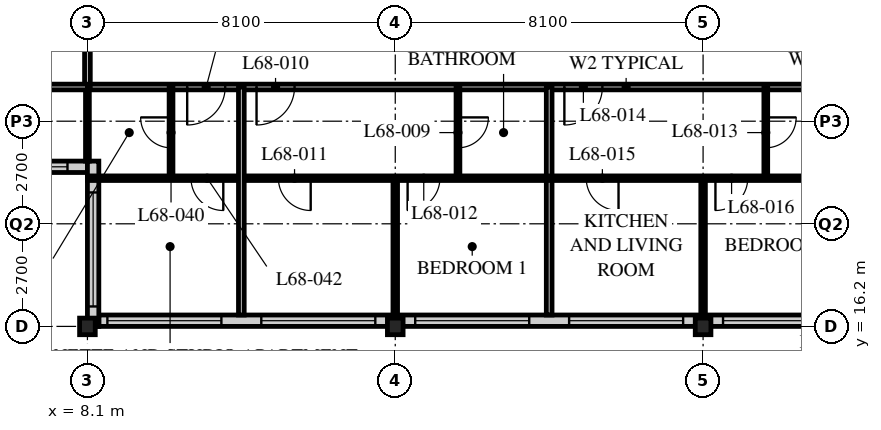
"""IFC4 building model, lengths in metres.
Left out: names, types, materials, properties, quantities, classifications, styles, units other than length and angle.
Written with IfcOpenShell. Run it as: python <this file> out.ifc"""

import sys

from ifc_helpers import new_model, si_unit, direction, frame, frame_2d, origin, origin_2d, place, context, subcontext, project, spatial, rectangle, i_section, extrude, element, fill, save


model = new_model("IFC4")
c1 = context("Model", 3, precision=1e-05, world=origin(), true_north=direction((0.0, 1.0)))
c2 = subcontext(c1, "Body", "Model", "MODEL_VIEW")
j1 = project(units=[si_unit("LENGTHUNIT", "METRE"), si_unit("PLANEANGLEUNIT", "RADIAN")], contexts=[c1])
p1 = place(None, origin())
s1 = spatial("IfcSite", under=j1, at=p1, CompositionType="ELEMENT")
p2 = place(p1, origin())
s2 = spatial("IfcBuilding", under=s1, at=p2, CompositionType="ELEMENT")
p3 = place(p2, frame((0.0, 0.0, 265.8)))
s3 = spatial("IfcBuildingStorey", under=s2, at=p3, CompositionType="ELEMENT", Elevation=265.8)
for number, where, z_axis, x_axis in (
    (1, (8.1, 16.2, 0.0), (0.0, 0.0, 1.0), (1.0, 0.0, 0.0)),
    (2, (16.2, 16.2, 0.0), (0.0, 0.0, 1.0), (1.0, 0.0, 0.0)),
    (3, (24.3, 16.2, 0.0), (0.0, 0.0, 1.0), (1.0, 0.0, 0.0)),
):
    element("IfcColumn", number, at=place(p3, frame(where, z_axis=z_axis, x_axis=x_axis)), inside=s3, PredefinedType="COLUMN", context=c2, shape_type="SweptSolid", body=[
        extrude(i_section(OverallWidth=0.412, OverallDepth=0.437, WebThickness=0.036, FlangeThickness=0.058, FilletRadius=0.015, at=origin_2d()), origin(), (0.0, 0.0, 1.0), 3.9),
    ])
p4 = place(p3, frame((8.4, 16.35, 0.0), z_axis=(0.0, 0.0, 1.0), x_axis=(1.0, 0.0, 0.0)))
e4 = element("IfcWall", 4, at=p4, inside=s3, PredefinedType="SOLIDWALL", context=c2, shape_type="SweptSolid", body=[
    extrude(rectangle(XDim=40.2, YDim=0.3, at=frame_2d((20.1, 0.0))), origin(), (0.0, 0.0, 1.0), 3.69),
])
p5 = place(p4, frame((0.225, 0.0, 0.6)))
e5 = element("IfcOpeningElement", 5, at=p5, cuts=e4, PredefinedType="OPENING", context=c2, shape_type="SweptSolid", body=[
    extrude(rectangle(XDim=3.0, YDim=2.4, at=frame_2d((1.5, 1.2))), frame((0.0, 0.16, 0.0), z_axis=(0.0, -1.0, 0.0), x_axis=(1.0, 0.0, 0.0)), (0.0, 0.0, 1.0), 0.32),
])
p6 = place(p4, frame((4.275, 0.0, 0.6)))
e6 = element("IfcOpeningElement", 6, at=p6, cuts=e4, PredefinedType="OPENING", context=c2, shape_type="SweptSolid", body=[
    extrude(rectangle(XDim=3.0, YDim=2.4, at=frame_2d((1.5, 1.2))), frame((0.0, 0.16, 0.0), z_axis=(0.0, -1.0, 0.0), x_axis=(1.0, 0.0, 0.0)), (0.0, 0.0, 1.0), 0.32),
])
p7 = place(p4, frame((8.325, 0.0, 0.6)))
e7 = element("IfcOpeningElement", 7, at=p7, cuts=e4, PredefinedType="OPENING", context=c2, shape_type="SweptSolid", body=[
    extrude(rectangle(XDim=3.0, YDim=2.4, at=frame_2d((1.5, 1.2))), frame((0.0, 0.16, 0.0), z_axis=(0.0, -1.0, 0.0), x_axis=(1.0, 0.0, 0.0)), (0.0, 0.0, 1.0), 0.32),
])
p8 = place(p4, frame((12.375, 0.0, 0.6)))
e8 = element("IfcOpeningElement", 8, at=p8, cuts=e4, PredefinedType="OPENING", context=c2, shape_type="SweptSolid", body=[
    extrude(rectangle(XDim=3.0, YDim=2.4, at=frame_2d((1.5, 1.2))), frame((0.0, 0.16, 0.0), z_axis=(0.0, -1.0, 0.0), x_axis=(1.0, 0.0, 0.0)), (0.0, 0.0, 1.0), 0.32),
])
p9 = place(p4, frame((16.425, 0.0, 0.6)))
e9 = element("IfcOpeningElement", 9, at=p9, cuts=e4, PredefinedType="OPENING", context=c2, shape_type="SweptSolid", body=[
    extrude(rectangle(XDim=3.0, YDim=2.4, at=frame_2d((1.5, 1.2))), frame((0.0, 0.16, 0.0), z_axis=(0.0, -1.0, 0.0), x_axis=(1.0, 0.0, 0.0)), (0.0, 0.0, 1.0), 0.32),
])
p10 = place(p4, frame((20.475, 0.0, 0.6)))
e10 = element("IfcOpeningElement", 10, at=p10, cuts=e4, PredefinedType="OPENING", context=c2, shape_type="SweptSolid", body=[
    extrude(rectangle(XDim=3.0, YDim=2.4, at=frame_2d((1.5, 1.2))), frame((0.0, 0.16, 0.0), z_axis=(0.0, -1.0, 0.0), x_axis=(1.0, 0.0, 0.0)), (0.0, 0.0, 1.0), 0.32),
])
p11 = place(p4, frame((24.525, 0.0, 0.6)))
e11 = element("IfcOpeningElement", 11, at=p11, cuts=e4, PredefinedType="OPENING", context=c2, shape_type="SweptSolid", body=[
    extrude(rectangle(XDim=3.0, YDim=2.4, at=frame_2d((1.5, 1.2))), frame((0.0, 0.16, 0.0), z_axis=(0.0, -1.0, 0.0), x_axis=(1.0, 0.0, 0.0)), (0.0, 0.0, 1.0), 0.32),
])
p12 = place(p4, frame((28.575, 0.0, 0.6)))
e12 = element("IfcOpeningElement", 12, at=p12, cuts=e4, PredefinedType="OPENING", context=c2, shape_type="SweptSolid", body=[
    extrude(rectangle(XDim=3.0, YDim=2.4, at=frame_2d((1.5, 1.2))), frame((0.0, 0.16, 0.0), z_axis=(0.0, -1.0, 0.0), x_axis=(1.0, 0.0, 0.0)), (0.0, 0.0, 1.0), 0.32),
])
p13 = place(p4, frame((32.625, 0.0, 0.6)))
e13 = element("IfcOpeningElement", 13, at=p13, cuts=e4, PredefinedType="OPENING", context=c2, shape_type="SweptSolid", body=[
    extrude(rectangle(XDim=3.0, YDim=2.4, at=frame_2d((1.5, 1.2))), frame((0.0, 0.16, 0.0), z_axis=(0.0, -1.0, 0.0), x_axis=(1.0, 0.0, 0.0)), (0.0, 0.0, 1.0), 0.32),
])
p14 = place(p4, frame((36.675, 0.0, 0.6)))
e14 = element("IfcOpeningElement", 14, at=p14, cuts=e4, PredefinedType="OPENING", context=c2, shape_type="SweptSolid", body=[
    extrude(rectangle(XDim=3.0, YDim=2.4, at=frame_2d((1.5, 1.2))), frame((0.0, 0.16, 0.0), z_axis=(0.0, -1.0, 0.0), x_axis=(1.0, 0.0, 0.0)), (0.0, 0.0, 1.0), 0.32),
])
p15 = place(p3, frame((4.35, 20.4, 0.0), z_axis=(0.0, 0.0, 1.0), x_axis=(1.0, 0.0, 0.0)))
e15 = element("IfcWall", 15, at=p15, inside=s3, PredefinedType="SOLIDWALL", context=c2, shape_type="SweptSolid", body=[
    extrude(rectangle(XDim=3.75, YDim=0.3, at=frame_2d((1.875, 0.0))), origin(), (0.0, 0.0, 1.0), 3.69),
])
p16 = place(p15, frame((0.225, 0.0, 0.6)))
e16 = element("IfcOpeningElement", 16, at=p16, cuts=e15, PredefinedType="OPENING", context=c2, shape_type="SweptSolid", body=[
    extrude(rectangle(XDim=3.0, YDim=2.3, at=frame_2d((1.5, 1.15))), frame((0.0, 0.16, 0.0), z_axis=(0.0, -1.0, 0.0), x_axis=(1.0, 0.0, 0.0)), (0.0, 0.0, 1.0), 0.32),
])
p17 = place(p3, frame((8.25, 20.55, 0.0), z_axis=(0.0, 0.0, 1.0), x_axis=(0.0, -1.0, 0.0)))
e17 = element("IfcWall", 17, at=p17, inside=s3, PredefinedType="SOLIDWALL", context=c2, shape_type="SweptSolid", body=[
    extrude(rectangle(XDim=4.35, YDim=0.3, at=frame_2d((2.175, 0.0))), origin(), (0.0, 0.0, 1.0), 3.69),
])
p18 = place(p17, frame((0.825, 0.0, 0.6)))
e18 = element("IfcOpeningElement", 18, at=p18, cuts=e17, PredefinedType="OPENING", context=c2, shape_type="SweptSolid", body=[
    extrude(rectangle(XDim=3.0, YDim=2.3, at=frame_2d((1.5, 1.15))), frame((0.0, 0.16, 0.0), z_axis=(0.0, -1.0, 0.0), x_axis=(1.0, 0.0, 0.0)), (0.0, 0.0, 1.0), 0.32),
])
p19 = place(p3, frame((8.1, 22.5, 0.0), z_axis=(0.0, 0.0, 1.0), x_axis=(1.0, 0.0, 0.0)))
e19 = element("IfcWall", 19, at=p19, inside=s3, PredefinedType="PARTITIONING", context=c2, shape_type="SweptSolid", body=[
    extrude(rectangle(XDim=28.35, YDim=0.15, at=frame_2d((14.175, 0.0))), origin(), (0.0, 0.0, 1.0), 3.69),
])
p20 = place(p19, frame((4.45, 0.0, 0.0)))
e20 = element("IfcOpeningElement", 20, at=p20, cuts=e19, PredefinedType="OPENING", context=c2, shape_type="SweptSolid", body=[
    extrude(rectangle(XDim=1.0, YDim=2.1, at=frame_2d((0.5, 1.05))), frame((0.0, 0.085, 0.0), z_axis=(0.0, -1.0, 0.0), x_axis=(1.0, 0.0, 0.0)), (0.0, 0.0, 1.0), 0.17),
])
p21 = place(p19, frame((12.55, 0.0, 0.0)))
e21 = element("IfcOpeningElement", 21, at=p21, cuts=e19, PredefinedType="OPENING", context=c2, shape_type="SweptSolid", body=[
    extrude(rectangle(XDim=1.0, YDim=2.1, at=frame_2d((0.5, 1.05))), frame((0.0, 0.085, 0.0), z_axis=(0.0, -1.0, 0.0), x_axis=(1.0, 0.0, 0.0)), (0.0, 0.0, 1.0), 0.17),
])
p22 = place(p19, frame((20.65, 0.0, 0.0)))
e22 = element("IfcOpeningElement", 22, at=p22, cuts=e19, PredefinedType="OPENING", context=c2, shape_type="SweptSolid", body=[
    extrude(rectangle(XDim=1.0, YDim=2.1, at=frame_2d((0.5, 1.05))), frame((0.0, 0.085, 0.0), z_axis=(0.0, -1.0, 0.0), x_axis=(1.0, 0.0, 0.0)), (0.0, 0.0, 1.0), 0.17),
])
p23 = place(p19, frame((2.625, 0.0, 0.0)))
e23 = element("IfcOpeningElement", 23, at=p23, cuts=e19, PredefinedType="OPENING", context=c2, shape_type="SweptSolid", body=[
    extrude(rectangle(XDim=1.0, YDim=2.1, at=frame_2d((0.5, 1.05))), frame((0.0, 0.085, 0.0), z_axis=(0.0, -1.0, 0.0), x_axis=(1.0, 0.0, 0.0)), (0.0, 0.0, 1.0), 0.17),
])
p24 = place(p3, frame((8.1, 22.5, 0.0), z_axis=(0.0, 0.0, 1.0), x_axis=(0.0, 1.0, 0.0)))
e24 = element("IfcWall", 24, at=p24, inside=s3, PredefinedType="PARTITIONING", context=c2, shape_type="SweptSolid", body=[
    extrude(rectangle(XDim=26.1, YDim=0.15, at=frame_2d((13.05, 0.0))), origin(), (0.0, 0.0, 1.0), 3.078),
])
p25 = place(p24, frame((2.65, 0.0, 0.0)))
e25 = element("IfcOpeningElement", 25, at=p25, cuts=e24, PredefinedType="OPENING", context=c2, shape_type="SweptSolid", body=[
    extrude(rectangle(XDim=1.0, YDim=2.1, at=frame_2d((0.5, 1.05))), frame((0.0, 0.085, 0.0), z_axis=(0.0, -1.0, 0.0), x_axis=(1.0, 0.0, 0.0)), (0.0, 0.0, 1.0), 0.17),
])
p26 = place(p24, frame((22.75, 0.0, 0.0)))
e26 = element("IfcOpeningElement", 26, at=p26, cuts=e24, PredefinedType="OPENING", context=c2, shape_type="SweptSolid", body=[
    extrude(rectangle(XDim=1.0, YDim=2.1, at=frame_2d((0.5, 1.05))), frame((0.0, 0.085, 0.0), z_axis=(0.0, -1.0, 0.0), x_axis=(1.0, 0.0, 0.0)), (0.0, 0.0, 1.0), 0.17),
])
p27 = place(p3, frame((17.85, 22.5, 0.0), z_axis=(0.0, 0.0, 1.0), x_axis=(0.0, -1.0, 0.0)))
e27 = element("IfcWall", 27, at=p27, inside=s3, PredefinedType="PARTITIONING", context=c2, shape_type="SweptSolid", body=[
    extrude(rectangle(XDim=2.4, YDim=0.1, at=frame_2d((1.2, 0.0))), origin(), (0.0, 0.0, 1.0), 3.69),
])
p28 = place(p27, frame((0.8, 0.0, 0.0)))
e28 = element("IfcOpeningElement", 28, at=p28, cuts=e27, PredefinedType="OPENING", context=c2, shape_type="SweptSolid", body=[
    extrude(rectangle(XDim=0.8, YDim=2.1, at=frame_2d((0.4, 1.05))), frame((0.0, 0.06, 0.0), z_axis=(0.0, -1.0, 0.0), x_axis=(1.0, 0.0, 0.0)), (0.0, 0.0, 1.0), 0.12),
])
p29 = place(p3, frame((16.2, 20.1, 0.0), z_axis=(0.0, 0.0, 1.0), x_axis=(0.0, -1.0, 0.0)))
e29 = element("IfcWall", 29, at=p29, inside=s3, PredefinedType="PARTITIONING", context=c2, shape_type="SweptSolid", body=[
    extrude(rectangle(XDim=3.6, YDim=0.12, at=frame_2d((1.8, 0.0))), origin(), (0.0, 0.0, 1.0), 3.078),
])
p30 = place(p3, frame((20.25, 22.5, 0.0), z_axis=(0.0, 0.0, 1.0), x_axis=(0.0, -1.0, 0.0)))
e30 = element("IfcWall", 30, at=p30, inside=s3, PredefinedType="PARTITIONING", context=c2, shape_type="SweptSolid", body=[
    extrude(rectangle(XDim=6.0, YDim=0.15, at=frame_2d((3.0, 0.0))), origin(), (0.0, 0.0, 1.0), 3.69),
])
p31 = place(p3, frame((25.95, 22.5, 0.0), z_axis=(0.0, 0.0, 1.0), x_axis=(0.0, -1.0, 0.0)))
e31 = element("IfcWall", 31, at=p31, inside=s3, PredefinedType="PARTITIONING", context=c2, shape_type="SweptSolid", body=[
    extrude(rectangle(XDim=2.4, YDim=0.1, at=frame_2d((1.2, 0.0))), origin(), (0.0, 0.0, 1.0), 3.69),
])
p32 = place(p31, frame((0.8, 0.0, 0.0)))
e32 = element("IfcOpeningElement", 32, at=p32, cuts=e31, PredefinedType="OPENING", context=c2, shape_type="SweptSolid", body=[
    extrude(rectangle(XDim=0.8, YDim=2.1, at=frame_2d((0.4, 1.05))), frame((0.0, 0.06, 0.0), z_axis=(0.0, -1.0, 0.0), x_axis=(1.0, 0.0, 0.0)), (0.0, 0.0, 1.0), 0.12),
])
p33 = place(p3, frame((24.3, 20.1, 0.0), z_axis=(0.0, 0.0, 1.0), x_axis=(0.0, -1.0, 0.0)))
e33 = element("IfcWall", 33, at=p33, inside=s3, PredefinedType="PARTITIONING", context=c2, shape_type="SweptSolid", body=[
    extrude(rectangle(XDim=3.6, YDim=0.12, at=frame_2d((1.8, 0.0))), origin(), (0.0, 0.0, 1.0), 3.078),
])
p34 = place(p3, frame((8.1, 20.1, 0.0), z_axis=(0.0, 0.0, 1.0), x_axis=(1.0, 0.0, 0.0)))
e34 = element("IfcWall", 34, at=p34, inside=s3, PredefinedType="PARTITIONING", context=c2, shape_type="SweptSolid", body=[
    extrude(rectangle(XDim=28.35, YDim=0.12, at=frame_2d((14.175, 0.0))), origin(), (0.0, 0.0, 1.0), 3.69),
])
p35 = place(p34, frame((5.025, 0.0, 0.0)))
e35 = element("IfcOpeningElement", 35, at=p35, cuts=e34, PredefinedType="OPENING", context=c2, shape_type="SweptSolid", body=[
    extrude(rectangle(XDim=0.85, YDim=2.1, at=frame_2d((0.425, 1.05))), frame((0.0, 0.07, 0.0), z_axis=(0.0, -1.0, 0.0), x_axis=(1.0, 0.0, 0.0)), (0.0, 0.0, 1.0), 0.14),
])
p36 = place(p34, frame((8.425, 0.0, 0.0)))
e36 = element("IfcOpeningElement", 36, at=p36, cuts=e34, PredefinedType="OPENING", context=c2, shape_type="SweptSolid", body=[
    extrude(rectangle(XDim=0.85, YDim=2.1, at=frame_2d((0.425, 1.05))), frame((0.0, 0.07, 0.0), z_axis=(0.0, -1.0, 0.0), x_axis=(1.0, 0.0, 0.0)), (0.0, 0.0, 1.0), 0.14),
])
p37 = place(p34, frame((13.125, 0.0, 0.0)))
e37 = element("IfcOpeningElement", 37, at=p37, cuts=e34, PredefinedType="OPENING", context=c2, shape_type="SweptSolid", body=[
    extrude(rectangle(XDim=0.85, YDim=2.1, at=frame_2d((0.425, 1.05))), frame((0.0, 0.07, 0.0), z_axis=(0.0, -1.0, 0.0), x_axis=(1.0, 0.0, 0.0)), (0.0, 0.0, 1.0), 0.14),
])
p38 = place(p34, frame((16.525, 0.0, 0.0)))
e38 = element("IfcOpeningElement", 38, at=p38, cuts=e34, PredefinedType="OPENING", context=c2, shape_type="SweptSolid", body=[
    extrude(rectangle(XDim=0.85, YDim=2.1, at=frame_2d((0.425, 1.05))), frame((0.0, 0.07, 0.0), z_axis=(0.0, -1.0, 0.0), x_axis=(1.0, 0.0, 0.0)), (0.0, 0.0, 1.0), 0.14),
])
p39 = place(p34, frame((21.225, 0.0, 0.0)))
e39 = element("IfcOpeningElement", 39, at=p39, cuts=e34, PredefinedType="OPENING", context=c2, shape_type="SweptSolid", body=[
    extrude(rectangle(XDim=0.85, YDim=2.1, at=frame_2d((0.425, 1.05))), frame((0.0, 0.07, 0.0), z_axis=(0.0, -1.0, 0.0), x_axis=(1.0, 0.0, 0.0)), (0.0, 0.0, 1.0), 0.14),
])
p40 = place(p34, frame((24.625, 0.0, 0.0)))
e40 = element("IfcOpeningElement", 40, at=p40, cuts=e34, PredefinedType="OPENING", context=c2, shape_type="SweptSolid", body=[
    extrude(rectangle(XDim=0.85, YDim=2.1, at=frame_2d((0.425, 1.05))), frame((0.0, 0.07, 0.0), z_axis=(0.0, -1.0, 0.0), x_axis=(1.0, 0.0, 0.0)), (0.0, 0.0, 1.0), 0.14),
])
p41 = place(p34, frame((2.725, 0.0, 0.0)))
e41 = element("IfcOpeningElement", 41, at=p41, cuts=e34, PredefinedType="OPENING", context=c2, shape_type="SweptSolid", body=[
    extrude(rectangle(XDim=0.85, YDim=2.1, at=frame_2d((0.425, 1.05))), frame((0.0, 0.07, 0.0), z_axis=(0.0, -1.0, 0.0), x_axis=(1.0, 0.0, 0.0)), (0.0, 0.0, 1.0), 0.14),
])
p42 = place(p3, frame((10.3, 22.5, 0.0), z_axis=(0.0, 0.0, 1.0), x_axis=(0.0, -1.0, 0.0)))
e42 = element("IfcWall", 42, at=p42, inside=s3, PredefinedType="PARTITIONING", context=c2, shape_type="SweptSolid", body=[
    extrude(rectangle(XDim=2.4, YDim=0.1, at=frame_2d((1.2, 0.0))), origin(), (0.0, 0.0, 1.0), 3.69),
])
p43 = place(p42, frame((0.8, 0.0, 0.0)))
e43 = element("IfcOpeningElement", 43, at=p43, cuts=e42, PredefinedType="OPENING", context=c2, shape_type="SweptSolid", body=[
    extrude(rectangle(XDim=0.8, YDim=2.1, at=frame_2d((0.4, 1.05))), frame((0.0, 0.06, 0.0), z_axis=(0.0, -1.0, 0.0), x_axis=(1.0, 0.0, 0.0)), (0.0, 0.0, 1.0), 0.12),
])
p44 = place(p3, frame((8.1, 22.5, 0.0), z_axis=(0.0, 0.0, 1.0), x_axis=(0.0, -1.0, 0.0)))
e44 = element("IfcWall", 44, at=p44, inside=s3, PredefinedType="PARTITIONING", context=c2, shape_type="SweptSolid", body=[
    extrude(rectangle(XDim=1.95, YDim=0.1, at=frame_2d((0.975, 0.0))), origin(), (0.0, 0.0, 1.0), 3.078),
])
p45 = place(p3, frame((4.35, 22.5, 0.0), z_axis=(0.0, 0.0, 1.0), x_axis=(1.0, 0.0, 0.0)))
e45 = element("IfcWall", 45, at=p45, inside=s3, PredefinedType="PARTITIONING", context=c2, shape_type="SweptSolid", body=[
    extrude(rectangle(XDim=3.75, YDim=0.15, at=frame_2d((1.875, 0.0))), origin(), (0.0, 0.0, 1.0), 3.69),
])
p46 = place(p3, frame((12.15, 22.5, 0.0), z_axis=(0.0, 0.0, 1.0), x_axis=(0.0, -1.0, 0.0)))
e46 = element("IfcWall", 46, at=p46, inside=s3, PredefinedType="PARTITIONING", context=c2, shape_type="SweptSolid", body=[
    extrude(rectangle(XDim=6.0, YDim=0.15, at=frame_2d((3.0, 0.0))), origin(), (0.0, 0.0, 1.0), 3.69),
])
p47 = place(p5, origin())
e47 = element("IfcWindow", 47, at=p47, inside=s3, PartitioningType="SINGLE_PANEL", PredefinedType="WINDOW", context=c2, shape_type="SweptSolid", body=[
    extrude(rectangle(XDim=3.0, YDim=2.4, at=frame_2d((1.5, 1.2))), frame((0.0, 0.03, 0.0), z_axis=(0.0, -1.0, 0.0), x_axis=(1.0, 0.0, 0.0)), (0.0, 0.0, 1.0), 0.06),
])
fill(e5, e47)
p48 = place(p6, origin())
e48 = element("IfcWindow", 48, at=p48, inside=s3, PartitioningType="SINGLE_PANEL", PredefinedType="WINDOW", context=c2, shape_type="SweptSolid", body=[
    extrude(rectangle(XDim=3.0, YDim=2.4, at=frame_2d((1.5, 1.2))), frame((0.0, 0.03, 0.0), z_axis=(0.0, -1.0, 0.0), x_axis=(1.0, 0.0, 0.0)), (0.0, 0.0, 1.0), 0.06),
])
fill(e6, e48)
p49 = place(p7, origin())
e49 = element("IfcWindow", 49, at=p49, inside=s3, PartitioningType="SINGLE_PANEL", PredefinedType="WINDOW", context=c2, shape_type="SweptSolid", body=[
    extrude(rectangle(XDim=3.0, YDim=2.4, at=frame_2d((1.5, 1.2))), frame((0.0, 0.03, 0.0), z_axis=(0.0, -1.0, 0.0), x_axis=(1.0, 0.0, 0.0)), (0.0, 0.0, 1.0), 0.06),
])
fill(e7, e49)
p50 = place(p8, origin())
e50 = element("IfcWindow", 50, at=p50, inside=s3, PartitioningType="SINGLE_PANEL", PredefinedType="WINDOW", context=c2, shape_type="SweptSolid", body=[
    extrude(rectangle(XDim=3.0, YDim=2.4, at=frame_2d((1.5, 1.2))), frame((0.0, 0.03, 0.0), z_axis=(0.0, -1.0, 0.0), x_axis=(1.0, 0.0, 0.0)), (0.0, 0.0, 1.0), 0.06),
])
fill(e8, e50)
p51 = place(p9, origin())
e51 = element("IfcWindow", 51, at=p51, inside=s3, PartitioningType="SINGLE_PANEL", PredefinedType="WINDOW", context=c2, shape_type="SweptSolid", body=[
    extrude(rectangle(XDim=3.0, YDim=2.4, at=frame_2d((1.5, 1.2))), frame((0.0, 0.03, 0.0), z_axis=(0.0, -1.0, 0.0), x_axis=(1.0, 0.0, 0.0)), (0.0, 0.0, 1.0), 0.06),
])
fill(e9, e51)
p52 = place(p16, origin())
e52 = element("IfcWindow", 52, at=p52, inside=s3, PartitioningType="SINGLE_PANEL", PredefinedType="WINDOW", context=c2, shape_type="SweptSolid", body=[
    extrude(rectangle(XDim=3.0, YDim=2.3, at=frame_2d((1.5, 1.15))), frame((0.0, 0.03, 0.0), z_axis=(0.0, -1.0, 0.0), x_axis=(1.0, 0.0, 0.0)), (0.0, 0.0, 1.0), 0.06),
])
fill(e16, e52)
p53 = place(p18, origin())
e53 = element("IfcWindow", 53, at=p53, inside=s3, PartitioningType="SINGLE_PANEL", PredefinedType="WINDOW", context=c2, shape_type="SweptSolid", body=[
    extrude(rectangle(XDim=3.0, YDim=2.3, at=frame_2d((1.5, 1.15))), frame((0.0, 0.03, 0.0), z_axis=(0.0, -1.0, 0.0), x_axis=(1.0, 0.0, 0.0)), (0.0, 0.0, 1.0), 0.06),
])
fill(e18, e53)
p54 = place(p28, origin())
e54 = element("IfcDoor", 54, at=p54, inside=s3, OperationType="SINGLE_SWING_LEFT", PredefinedType="DOOR", context=c2, shape_type="SweptSolid", body=[
    extrude(rectangle(XDim=0.8, YDim=2.1, at=frame_2d((0.4, 1.05))), frame((0.0, 0.025, 0.0), z_axis=(0.0, -1.0, 0.0), x_axis=(1.0, 0.0, 0.0)), (0.0, 0.0, 1.0), 0.05),
])
fill(e28, e54)
p55 = place(p20, origin())
e55 = element("IfcDoor", 55, at=p55, inside=s3, OperationType="SINGLE_SWING_RIGHT", PredefinedType="DOOR", context=c2, shape_type="SweptSolid", body=[
    extrude(rectangle(XDim=1.0, YDim=2.1, at=frame_2d((0.5, 1.05))), frame((0.0, 0.025, 0.0), z_axis=(0.0, -1.0, 0.0), x_axis=(1.0, 0.0, 0.0)), (0.0, 0.0, 1.0), 0.05),
])
fill(e20, e55)
p56 = place(p35, origin())
e56 = element("IfcDoor", 56, at=p56, inside=s3, OperationType="SINGLE_SWING_LEFT", PredefinedType="DOOR", context=c2, shape_type="SweptSolid", body=[
    extrude(rectangle(XDim=0.85, YDim=2.1, at=frame_2d((0.425, 1.05))), frame((0.0, 0.025, 0.0), z_axis=(0.0, -1.0, 0.0), x_axis=(1.0, 0.0, 0.0)), (0.0, 0.0, 1.0), 0.05),
])
fill(e35, e56)
p57 = place(p36, origin())
e57 = element("IfcDoor", 57, at=p57, inside=s3, OperationType="SINGLE_SWING_RIGHT", PredefinedType="DOOR", context=c2, shape_type="SweptSolid", body=[
    extrude(rectangle(XDim=0.85, YDim=2.1, at=frame_2d((0.425, 1.05))), frame((0.0, 0.025, 0.0), z_axis=(0.0, -1.0, 0.0), x_axis=(1.0, 0.0, 0.0)), (0.0, 0.0, 1.0), 0.05),
])
fill(e36, e57)
p58 = place(p32, origin())
e58 = element("IfcDoor", 58, at=p58, inside=s3, OperationType="SINGLE_SWING_LEFT", PredefinedType="DOOR", context=c2, shape_type="SweptSolid", body=[
    extrude(rectangle(XDim=0.8, YDim=2.1, at=frame_2d((0.4, 1.05))), frame((0.0, 0.025, 0.0), z_axis=(0.0, -1.0, 0.0), x_axis=(1.0, 0.0, 0.0)), (0.0, 0.0, 1.0), 0.05),
])
fill(e32, e58)
p59 = place(p21, origin())
e59 = element("IfcDoor", 59, at=p59, inside=s3, OperationType="SINGLE_SWING_RIGHT", PredefinedType="DOOR", context=c2, shape_type="SweptSolid", body=[
    extrude(rectangle(XDim=1.0, YDim=2.1, at=frame_2d((0.5, 1.05))), frame((0.0, 0.025, 0.0), z_axis=(0.0, -1.0, 0.0), x_axis=(1.0, 0.0, 0.0)), (0.0, 0.0, 1.0), 0.05),
])
fill(e21, e59)
p60 = place(p37, origin())
e60 = element("IfcDoor", 60, at=p60, inside=s3, OperationType="SINGLE_SWING_LEFT", PredefinedType="DOOR", context=c2, shape_type="SweptSolid", body=[
    extrude(rectangle(XDim=0.85, YDim=2.1, at=frame_2d((0.425, 1.05))), frame((0.0, 0.025, 0.0), z_axis=(0.0, -1.0, 0.0), x_axis=(1.0, 0.0, 0.0)), (0.0, 0.0, 1.0), 0.05),
])
fill(e37, e60)
p61 = place(p38, origin())
e61 = element("IfcDoor", 61, at=p61, inside=s3, OperationType="SINGLE_SWING_RIGHT", PredefinedType="DOOR", context=c2, shape_type="SweptSolid", body=[
    extrude(rectangle(XDim=0.85, YDim=2.1, at=frame_2d((0.425, 1.05))), frame((0.0, 0.025, 0.0), z_axis=(0.0, -1.0, 0.0), x_axis=(1.0, 0.0, 0.0)), (0.0, 0.0, 1.0), 0.05),
])
fill(e38, e61)
p62 = place(p43, origin())
e62 = element("IfcDoor", 62, at=p62, inside=s3, OperationType="SINGLE_SWING_RIGHT", PredefinedType="DOOR", context=c2, shape_type="SweptSolid", body=[
    extrude(rectangle(XDim=0.8, YDim=2.1, at=frame_2d((0.4, 1.05))), frame((0.0, 0.025, 0.0), z_axis=(0.0, -1.0, 0.0), x_axis=(1.0, 0.0, 0.0)), (0.0, 0.0, 1.0), 0.05),
])
fill(e43, e62)
p63 = place(p23, origin())
e63 = element("IfcDoor", 63, at=p63, inside=s3, OperationType="SINGLE_SWING_RIGHT", PredefinedType="DOOR", context=c2, shape_type="SweptSolid", body=[
    extrude(rectangle(XDim=1.0, YDim=2.1, at=frame_2d((0.5, 1.05))), frame((0.0, 0.025, 0.0), z_axis=(0.0, -1.0, 0.0), x_axis=(1.0, 0.0, 0.0)), (0.0, 0.0, 1.0), 0.05),
])
fill(e23, e63)
p64 = place(p41, origin())
e64 = element("IfcDoor", 64, at=p64, inside=s3, OperationType="SINGLE_SWING_LEFT", PredefinedType="DOOR", context=c2, shape_type="SweptSolid", body=[
    extrude(rectangle(XDim=0.85, YDim=2.1, at=frame_2d((0.425, 1.05))), frame((0.0, 0.025, 0.0), z_axis=(0.0, -1.0, 0.0), x_axis=(1.0, 0.0, 0.0)), (0.0, 0.0, 1.0), 0.05),
])
fill(e41, e64)
save(model, sys.argv[1])
